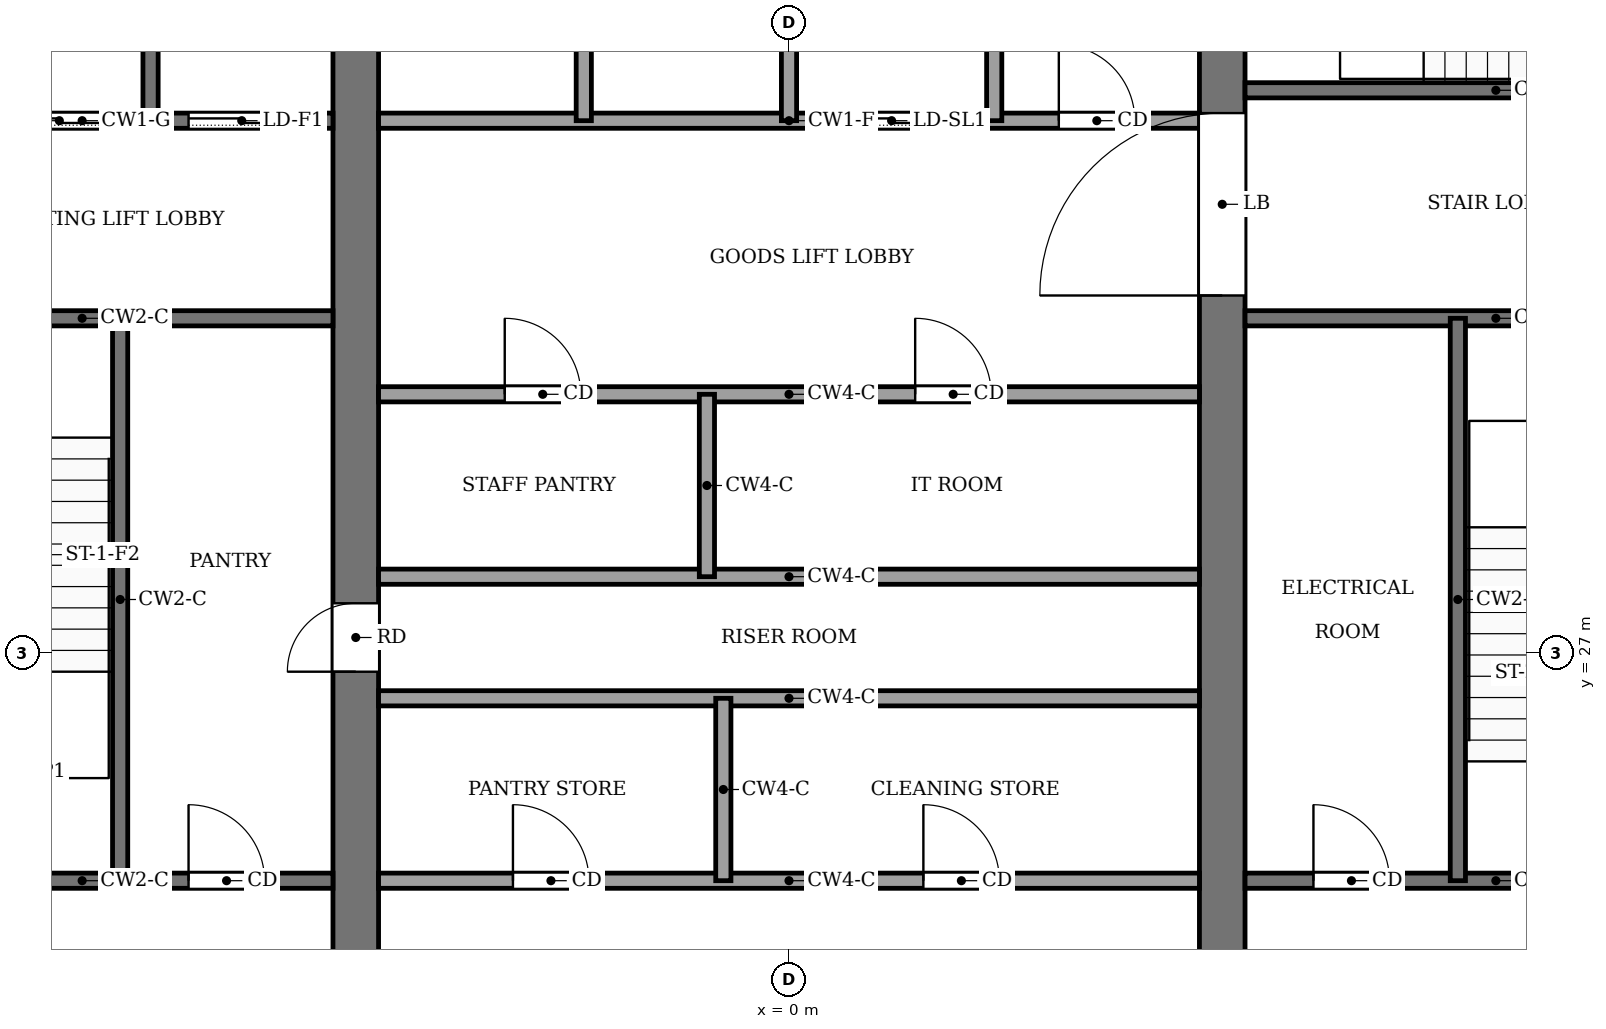
"""IFC4 building model, lengths in metres.
Left out: names, types, materials, properties, quantities, classifications, styles, units other than length and angle.
Written with IfcOpenShell. Run it as: python <this file> out.ifc"""

import sys

from ifc_helpers import new_model, si_unit, direction, frame, frame_2d, origin, place, context, subcontext, project, spatial, rectangle, extrude, element, fill, save


model = new_model("IFC4")
c1 = context("Model", 3, precision=1e-05, world=origin(), true_north=direction((0.0, 1.0)))
c2 = subcontext(c1, "Body", "Model", "MODEL_VIEW")
j1 = project(units=[si_unit("LENGTHUNIT", "METRE"), si_unit("PLANEANGLEUNIT", "RADIAN")], contexts=[c1])
p1 = place(None, origin())
s1 = spatial("IfcSite", under=j1, at=p1, CompositionType="ELEMENT")
p2 = place(p1, origin())
s2 = spatial("IfcBuilding", under=s1, at=p2, CompositionType="ELEMENT")
p3 = place(p2, frame((0.0, 0.0, 306.0)))
s3 = spatial("IfcBuildingStorey", under=s2, at=p3, CompositionType="ELEMENT", Elevation=306.0)
p4 = place(p3, frame((-5.7, 18.4, -0.13), z_axis=(0.0, 0.0, 1.0), x_axis=(0.0, 1.0, 0.0)))
e1 = element("IfcWall", 1, at=p4, inside=s3, PredefinedType="SHEAR", context=c2, shape_type="SweptSolid", body=[
    extrude(rectangle(XDim=19.2, YDim=0.6, at=frame_2d((9.6, 0.0))), origin(), (0.0, 0.0, 1.0), 4.0),
])
p5 = place(p4, frame((8.35, 0.0, 0.13)))
e2 = element("IfcOpeningElement", 2, at=p5, cuts=e1, PredefinedType="OPENING", context=c2, shape_type="SweptSolid", body=[
    extrude(rectangle(XDim=0.9, YDim=2.1, at=frame_2d((0.45, 1.05))), frame((0.0, 0.31, 0.0), z_axis=(0.0, -1.0, 0.0), x_axis=(1.0, 0.0, 0.0)), (0.0, 0.0, 1.0), 0.62),
])
p6 = place(p3, frame((5.7, 18.4, -0.13), z_axis=(0.0, 0.0, 1.0), x_axis=(0.0, 1.0, 0.0)))
e3 = element("IfcWall", 3, at=p6, inside=s3, PredefinedType="SHEAR", context=c2, shape_type="SweptSolid", body=[
    extrude(rectangle(XDim=19.2, YDim=0.6, at=frame_2d((9.6, 0.0))), origin(), (0.0, 0.0, 1.0), 4.0),
])
p7 = place(p6, frame((13.3, 0.0, 0.13)))
e4 = element("IfcOpeningElement", 4, at=p7, cuts=e3, PredefinedType="OPENING", context=c2, shape_type="SweptSolid", body=[
    extrude(rectangle(XDim=2.4, YDim=2.4, at=frame_2d((1.2, 1.2))), frame((0.0, 0.31, 0.0), z_axis=(0.0, -1.0, 0.0), x_axis=(1.0, 0.0, 0.0)), (0.0, 0.0, 1.0), 0.62),
])
p8 = place(p3, frame((-12.6, 24.0, 0.0), z_axis=(0.0, 0.0, 1.0), x_axis=(1.0, 0.0, 0.0)))
e5 = element("IfcWall", 5, at=p8, inside=s3, PredefinedType="PARTITIONING", context=c2, shape_type="SweptSolid", body=[
    extrude(rectangle(XDim=6.6, YDim=0.2, at=frame_2d((3.3, 0.0))), origin(), (0.0, 0.0, 1.0), 3.87),
])
p9 = place(p8, frame((4.7, 0.0, 0.0)))
e6 = element("IfcOpeningElement", 6, at=p9, cuts=e5, PredefinedType="OPENING", context=c2, shape_type="SweptSolid", body=[
    extrude(rectangle(XDim=1.0, YDim=2.1, at=frame_2d((0.5, 1.05))), frame((0.0, 0.11, 0.0), z_axis=(0.0, -1.0, 0.0), x_axis=(1.0, 0.0, 0.0)), (0.0, 0.0, 1.0), 0.22),
])
p10 = place(p3, frame((-5.4, 24.0, 0.0), z_axis=(0.0, 0.0, 1.0), x_axis=(1.0, 0.0, 0.0)))
e7 = element("IfcWall", 7, at=p10, inside=s3, PredefinedType="PARTITIONING", context=c2, shape_type="SweptSolid", body=[
    extrude(rectangle(XDim=10.8, YDim=0.2, at=frame_2d((5.4, 0.0))), origin(), (0.0, 0.0, 1.0), 3.87),
])
p11 = place(p10, frame((1.768, 0.0, 0.0)))
e8 = element("IfcOpeningElement", 8, at=p11, cuts=e7, PredefinedType="OPENING", context=c2, shape_type="SweptSolid", body=[
    extrude(rectangle(XDim=1.0, YDim=2.1, at=frame_2d((0.5, 1.05))), frame((0.0, 0.11, 0.0), z_axis=(0.0, -1.0, 0.0), x_axis=(1.0, 0.0, 0.0)), (0.0, 0.0, 1.0), 0.22),
])
p12 = place(p10, frame((7.168, 0.0, 0.0)))
e9 = element("IfcOpeningElement", 9, at=p12, cuts=e7, PredefinedType="OPENING", context=c2, shape_type="SweptSolid", body=[
    extrude(rectangle(XDim=1.0, YDim=2.1, at=frame_2d((0.5, 1.05))), frame((0.0, 0.11, 0.0), z_axis=(0.0, -1.0, 0.0), x_axis=(1.0, 0.0, 0.0)), (0.0, 0.0, 1.0), 0.22),
])
p13 = place(p3, frame((6.0, 24.0, 0.0), z_axis=(0.0, 0.0, 1.0), x_axis=(1.0, 0.0, 0.0)))
e10 = element("IfcWall", 10, at=p13, inside=s3, PredefinedType="PARTITIONING", context=c2, shape_type="SweptSolid", body=[
    extrude(rectangle(XDim=6.6, YDim=0.2, at=frame_2d((3.3, 0.0))), origin(), (0.0, 0.0, 1.0), 3.87),
])
p14 = place(p13, frame((0.9, 0.0, 0.0)))
e11 = element("IfcOpeningElement", 11, at=p14, cuts=e10, PredefinedType="OPENING", context=c2, shape_type="SweptSolid", body=[
    extrude(rectangle(XDim=1.0, YDim=2.1, at=frame_2d((0.5, 1.05))), frame((0.0, 0.11, 0.0), z_axis=(0.0, -1.0, 0.0), x_axis=(1.0, 0.0, 0.0)), (0.0, 0.0, 1.0), 0.22),
])
p15 = place(p13, frame((4.4, 0.0, 0.0)))
e12 = element("IfcOpeningElement", 12, at=p15, cuts=e10, PredefinedType="OPENING", context=c2, shape_type="SweptSolid", body=[
    extrude(rectangle(XDim=1.2, YDim=2.2, at=frame_2d((0.6, 1.1))), frame((0.0, 0.11, 0.0), z_axis=(0.0, -1.0, 0.0), x_axis=(1.0, 0.0, 0.0)), (0.0, 0.0, 1.0), 0.22),
])
for number, where, z_axis, x_axis in (
    (13, (-5.4, 26.4, 0.0), (0.0, 0.0, 1.0), (1.0, 0.0, 0.0)),
    (14, (-5.4, 28.0, 0.0), (0.0, 0.0, 1.0), (1.0, 0.0, 0.0)),
):
    element("IfcWall", number, at=place(p3, frame(where, z_axis=z_axis, x_axis=x_axis)), inside=s3, PredefinedType="PARTITIONING", context=c2, shape_type="SweptSolid", body=[
        extrude(rectangle(XDim=10.8, YDim=0.2, at=frame_2d((5.4, 0.0))), origin(), (0.0, 0.0, 1.0), 3.87),
    ])
p16 = place(p3, frame((-5.4, 30.4, 0.0), z_axis=(0.0, 0.0, 1.0), x_axis=(1.0, 0.0, 0.0)))
e15 = element("IfcWall", 15, at=p16, inside=s3, PredefinedType="PARTITIONING", context=c2, shape_type="SweptSolid", body=[
    extrude(rectangle(XDim=10.8, YDim=0.2, at=frame_2d((5.4, 0.0))), origin(), (0.0, 0.0, 1.0), 3.87),
])
p17 = place(p16, frame((1.66, 0.0, 0.0)))
e16 = element("IfcOpeningElement", 16, at=p17, cuts=e15, PredefinedType="OPENING", context=c2, shape_type="SweptSolid", body=[
    extrude(rectangle(XDim=1.0, YDim=2.1, at=frame_2d((0.5, 1.05))), frame((0.0, 0.11, 0.0), z_axis=(0.0, -1.0, 0.0), x_axis=(1.0, 0.0, 0.0)), (0.0, 0.0, 1.0), 0.22),
])
p18 = place(p16, frame((7.06, 0.0, 0.0)))
e17 = element("IfcOpeningElement", 17, at=p18, cuts=e15, PredefinedType="OPENING", context=c2, shape_type="SweptSolid", body=[
    extrude(rectangle(XDim=1.0, YDim=2.1, at=frame_2d((0.5, 1.05))), frame((0.0, 0.11, 0.0), z_axis=(0.0, -1.0, 0.0), x_axis=(1.0, 0.0, 0.0)), (0.0, 0.0, 1.0), 0.22),
])
p19 = place(p3, frame((-12.6, 31.4, 0.0), z_axis=(0.0, 0.0, 1.0), x_axis=(1.0, 0.0, 0.0)))
e18 = element("IfcWall", 18, at=p19, inside=s3, PredefinedType="PARTITIONING", context=c2, shape_type="SweptSolid", body=[
    extrude(rectangle(XDim=6.6, YDim=0.2, at=frame_2d((3.3, 0.0))), origin(), (0.0, 0.0, 1.0), 3.87),
])
p20 = place(p19, frame((1.0, 0.0, 0.0)))
e19 = element("IfcOpeningElement", 19, at=p20, cuts=e18, PredefinedType="OPENING", context=c2, shape_type="SweptSolid", body=[
    extrude(rectangle(XDim=1.2, YDim=2.2, at=frame_2d((0.6, 1.1))), frame((0.0, 0.11, 0.0), z_axis=(0.0, -1.0, 0.0), x_axis=(1.0, 0.0, 0.0)), (0.0, 0.0, 1.0), 0.22),
])
p21 = place(p3, frame((6.0, 31.4, 0.0), z_axis=(0.0, 0.0, 1.0), x_axis=(1.0, 0.0, 0.0)))
e20 = element("IfcWall", 20, at=p21, inside=s3, PredefinedType="PARTITIONING", context=c2, shape_type="SweptSolid", body=[
    extrude(rectangle(XDim=6.6, YDim=0.2, at=frame_2d((3.3, 0.0))), origin(), (0.0, 0.0, 1.0), 3.87),
])
p22 = place(p3, frame((-12.6, 34.0, 0.0), z_axis=(0.0, 0.0, 1.0), x_axis=(1.0, 0.0, 0.0)))
e21 = element("IfcWall", 21, at=p22, inside=s3, PredefinedType="PARTITIONING", context=c2, shape_type="SweptSolid", body=[
    extrude(rectangle(XDim=6.6, YDim=0.2, at=frame_2d((3.3, 0.0))), origin(), (0.0, 0.0, 1.0), 3.87),
])
p23 = place(p22, frame((4.7, 0.0, 0.0)))
e22 = element("IfcOpeningElement", 22, at=p23, cuts=e21, PredefinedType="OPENING", context=c2, shape_type="SweptSolid", body=[
    extrude(rectangle(XDim=1.4, YDim=2.2, at=frame_2d((0.7, 1.1))), frame((0.0, 0.11, 0.0), z_axis=(0.0, -1.0, 0.0), x_axis=(1.0, 0.0, 0.0)), (0.0, 0.0, 1.0), 0.22),
])
p24 = place(p22, frame((2.3, 0.0, 0.0)))
e23 = element("IfcOpeningElement", 23, at=p24, cuts=e21, PredefinedType="OPENING", context=c2, shape_type="SweptSolid", body=[
    extrude(rectangle(XDim=1.4, YDim=2.2, at=frame_2d((0.7, 1.1))), frame((0.0, 0.11, 0.0), z_axis=(0.0, -1.0, 0.0), x_axis=(1.0, 0.0, 0.0)), (0.0, 0.0, 1.0), 0.22),
])
p25 = place(p22, frame((0.45, 0.0, 0.0)))
e24 = element("IfcOpeningElement", 24, at=p25, cuts=e21, PredefinedType="OPENING", context=c2, shape_type="SweptSolid", body=[
    extrude(rectangle(XDim=0.9, YDim=2.1, at=frame_2d((0.45, 1.05))), frame((0.0, 0.11, 0.0), z_axis=(0.0, -1.0, 0.0), x_axis=(1.0, 0.0, 0.0)), (0.0, 0.0, 1.0), 0.22),
])
p26 = place(p3, frame((-5.4, 34.0, 0.0), z_axis=(0.0, 0.0, 1.0), x_axis=(1.0, 0.0, 0.0)))
e25 = element("IfcWall", 25, at=p26, inside=s3, PredefinedType="PARTITIONING", context=c2, shape_type="SweptSolid", body=[
    extrude(rectangle(XDim=10.8, YDim=0.2, at=frame_2d((5.4, 0.0))), origin(), (0.0, 0.0, 1.0), 3.87),
])
p27 = place(p26, frame((6.15, 0.0, 0.0)))
e26 = element("IfcOpeningElement", 26, at=p27, cuts=e25, PredefinedType="OPENING", context=c2, shape_type="SweptSolid", body=[
    extrude(rectangle(XDim=1.2, YDim=2.2, at=frame_2d((0.6, 1.1))), frame((0.0, 0.11, 0.0), z_axis=(0.0, -1.0, 0.0), x_axis=(1.0, 0.0, 0.0)), (0.0, 0.0, 1.0), 0.22),
])
p28 = place(p26, frame((8.95, 0.0, 0.0)))
e27 = element("IfcOpeningElement", 27, at=p28, cuts=e25, PredefinedType="OPENING", context=c2, shape_type="SweptSolid", body=[
    extrude(rectangle(XDim=1.0, YDim=2.1, at=frame_2d((0.5, 1.05))), frame((0.0, 0.11, 0.0), z_axis=(0.0, -1.0, 0.0), x_axis=(1.0, 0.0, 0.0)), (0.0, 0.0, 1.0), 0.22),
])
p29 = place(p3, frame((6.0, 34.4, 0.0), z_axis=(0.0, 0.0, 1.0), x_axis=(1.0, 0.0, 0.0)))
e28 = element("IfcWall", 28, at=p29, inside=s3, PredefinedType="PARTITIONING", context=c2, shape_type="SweptSolid", body=[
    extrude(rectangle(XDim=6.6, YDim=0.2, at=frame_2d((3.3, 0.0))), origin(), (0.0, 0.0, 1.0), 3.87),
])
p30 = place(p29, frame((4.8, 0.0, 0.0)))
e29 = element("IfcOpeningElement", 29, at=p30, cuts=e28, PredefinedType="OPENING", context=c2, shape_type="SweptSolid", body=[
    extrude(rectangle(XDim=1.2, YDim=2.2, at=frame_2d((0.6, 1.1))), frame((0.0, 0.11, 0.0), z_axis=(0.0, -1.0, 0.0), x_axis=(1.0, 0.0, 0.0)), (0.0, 0.0, 1.0), 0.22),
])
p31 = place(p3, frame((-8.8, 24.0, 0.0), z_axis=(0.0, 0.0, 1.0), x_axis=(0.0, 1.0, 0.0)))
e30 = element("IfcWall", 30, at=p31, inside=s3, PredefinedType="PARTITIONING", context=c2, shape_type="SweptSolid", body=[
    extrude(rectangle(XDim=7.4, YDim=0.2, at=frame_2d((3.7, 0.0))), origin(), (0.0, 0.0, 1.0), 3.87),
])
for number, where, z_axis, x_axis in (
    (31, (-8.4, 34.0, 0.0), (0.0, 0.0, 1.0), (0.0, 1.0, 0.0)),
    (32, (-2.7, 34.0, 0.0), (0.0, 0.0, 1.0), (0.0, 1.0, 0.0)),
):
    element("IfcWall", number, at=place(p3, frame(where, z_axis=z_axis, x_axis=x_axis)), inside=s3, PredefinedType="PARTITIONING", context=c2, shape_type="SweptSolid", body=[
        extrude(rectangle(XDim=3.6, YDim=0.2, at=frame_2d((1.8, 0.0))), origin(), (0.0, 0.0, 1.0), 3.87),
    ])
for number, where, z_axis, x_axis in (
    (33, (-1.08, 28.0, 0.0), (0.0, 0.0, 1.0), (0.0, 1.0, 0.0)),
    (34, (-0.864, 24.0, 0.0), (0.0, 0.0, 1.0), (0.0, 1.0, 0.0)),
):
    element("IfcWall", number, at=place(p3, frame(where, z_axis=z_axis, x_axis=x_axis)), inside=s3, PredefinedType="PARTITIONING", context=c2, shape_type="SweptSolid", body=[
        extrude(rectangle(XDim=2.4, YDim=0.2, at=frame_2d((1.2, 0.0))), origin(), (0.0, 0.0, 1.0), 3.87),
    ])
for number, where, z_axis, x_axis in (
    (35, (0.0, 34.0, 0.0), (0.0, 0.0, 1.0), (0.0, 1.0, 0.0)),
    (36, (2.7, 34.0, 0.0), (0.0, 0.0, 1.0), (0.0, 1.0, 0.0)),
):
    element("IfcWall", number, at=place(p3, frame(where, z_axis=z_axis, x_axis=x_axis)), inside=s3, PredefinedType="PARTITIONING", context=c2, shape_type="SweptSolid", body=[
        extrude(rectangle(XDim=3.6, YDim=0.2, at=frame_2d((1.8, 0.0))), origin(), (0.0, 0.0, 1.0), 3.87),
    ])
p32 = place(p3, frame((8.8, 24.0, 0.0), z_axis=(0.0, 0.0, 1.0), x_axis=(0.0, 1.0, 0.0)))
e37 = element("IfcWall", 37, at=p32, inside=s3, PredefinedType="PARTITIONING", context=c2, shape_type="SweptSolid", body=[
    extrude(rectangle(XDim=7.4, YDim=0.2, at=frame_2d((3.7, 0.0))), origin(), (0.0, 0.0, 1.0), 3.87),
])
p33 = place(p27, origin())
e38 = element("IfcDoor", 38, at=p33, inside=s3, OperationType="SLIDING_TO_LEFT", PredefinedType="DOOR", context=c2, shape_type="SweptSolid", body=[
    extrude(rectangle(XDim=1.2, YDim=2.2, at=frame_2d((0.6, 1.1))), frame((0.0, 0.025, 0.0), z_axis=(0.0, -1.0, 0.0), x_axis=(1.0, 0.0, 0.0)), (0.0, 0.0, 1.0), 0.05),
])
fill(e26, e38)
p34 = place(p23, origin())
e39 = element("IfcDoor", 39, at=p34, inside=s3, OperationType="SLIDING_TO_LEFT", PredefinedType="DOOR", context=c2, shape_type="SweptSolid", body=[
    extrude(rectangle(XDim=1.4, YDim=2.2, at=frame_2d((0.7, 1.1))), frame((0.0, 0.025, 0.0), z_axis=(0.0, -1.0, 0.0), x_axis=(1.0, 0.0, 0.0)), (0.0, 0.0, 1.0), 0.05),
])
fill(e22, e39)
p35 = place(p24, origin())
e40 = element("IfcDoor", 40, at=p35, inside=s3, OperationType="SLIDING_TO_LEFT", PredefinedType="DOOR", context=c2, shape_type="SweptSolid", body=[
    extrude(rectangle(XDim=1.4, YDim=2.2, at=frame_2d((0.7, 1.1))), frame((0.0, 0.025, 0.0), z_axis=(0.0, -1.0, 0.0), x_axis=(1.0, 0.0, 0.0)), (0.0, 0.0, 1.0), 0.05),
])
fill(e23, e40)
p36 = place(p11, origin())
e41 = element("IfcDoor", 41, at=p36, inside=s3, OperationType="SINGLE_SWING_LEFT", PredefinedType="DOOR", context=c2, shape_type="SweptSolid", body=[
    extrude(rectangle(XDim=1.0, YDim=2.1, at=frame_2d((0.5, 1.05))), frame((0.0, 0.025, 0.0), z_axis=(0.0, -1.0, 0.0), x_axis=(1.0, 0.0, 0.0)), (0.0, 0.0, 1.0), 0.05),
])
fill(e8, e41)
p37 = place(p12, origin())
e42 = element("IfcDoor", 42, at=p37, inside=s3, OperationType="SINGLE_SWING_RIGHT", PredefinedType="DOOR", context=c2, shape_type="SweptSolid", body=[
    extrude(rectangle(XDim=1.0, YDim=2.1, at=frame_2d((0.5, 1.05))), frame((0.0, 0.025, 0.0), z_axis=(0.0, -1.0, 0.0), x_axis=(1.0, 0.0, 0.0)), (0.0, 0.0, 1.0), 0.05),
])
fill(e9, e42)
p38 = place(p17, origin())
e43 = element("IfcDoor", 43, at=p38, inside=s3, OperationType="SINGLE_SWING_RIGHT", PredefinedType="DOOR", context=c2, shape_type="SweptSolid", body=[
    extrude(rectangle(XDim=1.0, YDim=2.1, at=frame_2d((0.5, 1.05))), frame((0.0, 0.025, 0.0), z_axis=(0.0, -1.0, 0.0), x_axis=(1.0, 0.0, 0.0)), (0.0, 0.0, 1.0), 0.05),
])
fill(e16, e43)
p39 = place(p18, origin())
e44 = element("IfcDoor", 44, at=p39, inside=s3, OperationType="SINGLE_SWING_LEFT", PredefinedType="DOOR", context=c2, shape_type="SweptSolid", body=[
    extrude(rectangle(XDim=1.0, YDim=2.1, at=frame_2d((0.5, 1.05))), frame((0.0, 0.025, 0.0), z_axis=(0.0, -1.0, 0.0), x_axis=(1.0, 0.0, 0.0)), (0.0, 0.0, 1.0), 0.05),
])
fill(e17, e44)
p40 = place(p9, origin())
e45 = element("IfcDoor", 45, at=p40, inside=s3, OperationType="SINGLE_SWING_RIGHT", PredefinedType="DOOR", context=c2, shape_type="SweptSolid", body=[
    extrude(rectangle(XDim=1.0, YDim=2.1, at=frame_2d((0.5, 1.05))), frame((0.0, 0.025, 0.0), z_axis=(0.0, -1.0, 0.0), x_axis=(1.0, 0.0, 0.0)), (0.0, 0.0, 1.0), 0.05),
])
fill(e6, e45)
p41 = place(p14, origin())
e46 = element("IfcDoor", 46, at=p41, inside=s3, OperationType="SINGLE_SWING_LEFT", PredefinedType="DOOR", context=c2, shape_type="SweptSolid", body=[
    extrude(rectangle(XDim=1.0, YDim=2.1, at=frame_2d((0.5, 1.05))), frame((0.0, 0.025, 0.0), z_axis=(0.0, -1.0, 0.0), x_axis=(1.0, 0.0, 0.0)), (0.0, 0.0, 1.0), 0.05),
])
fill(e11, e46)
p42 = place(p28, origin())
e47 = element("IfcDoor", 47, at=p42, inside=s3, OperationType="SINGLE_SWING_LEFT", PredefinedType="DOOR", context=c2, shape_type="SweptSolid", body=[
    extrude(rectangle(XDim=1.0, YDim=2.1, at=frame_2d((0.5, 1.05))), frame((0.0, 0.025, 0.0), z_axis=(0.0, -1.0, 0.0), x_axis=(1.0, 0.0, 0.0)), (0.0, 0.0, 1.0), 0.05),
])
fill(e27, e47)
p43 = place(p5, origin())
e48 = element("IfcDoor", 48, at=p43, inside=s3, OperationType="SINGLE_SWING_RIGHT", PredefinedType="DOOR", context=c2, shape_type="SweptSolid", body=[
    extrude(rectangle(XDim=0.9, YDim=2.1, at=frame_2d((0.45, 1.05))), frame((0.0, 0.025, 0.0), z_axis=(0.0, -1.0, 0.0), x_axis=(1.0, 0.0, 0.0)), (0.0, 0.0, 1.0), 0.05),
])
fill(e2, e48)
p44 = place(p7, origin())
e49 = element("IfcDoor", 49, at=p44, inside=s3, OperationType="DOUBLE_DOOR_SINGLE_SWING", PredefinedType="DOOR", context=c2, shape_type="SweptSolid", body=[
    extrude(rectangle(XDim=2.4, YDim=2.4, at=frame_2d((1.2, 1.2))), frame((0.0, 0.025, 0.0), z_axis=(0.0, -1.0, 0.0), x_axis=(1.0, 0.0, 0.0)), (0.0, 0.0, 1.0), 0.05),
])
fill(e4, e49)
save(model, sys.argv[1])
